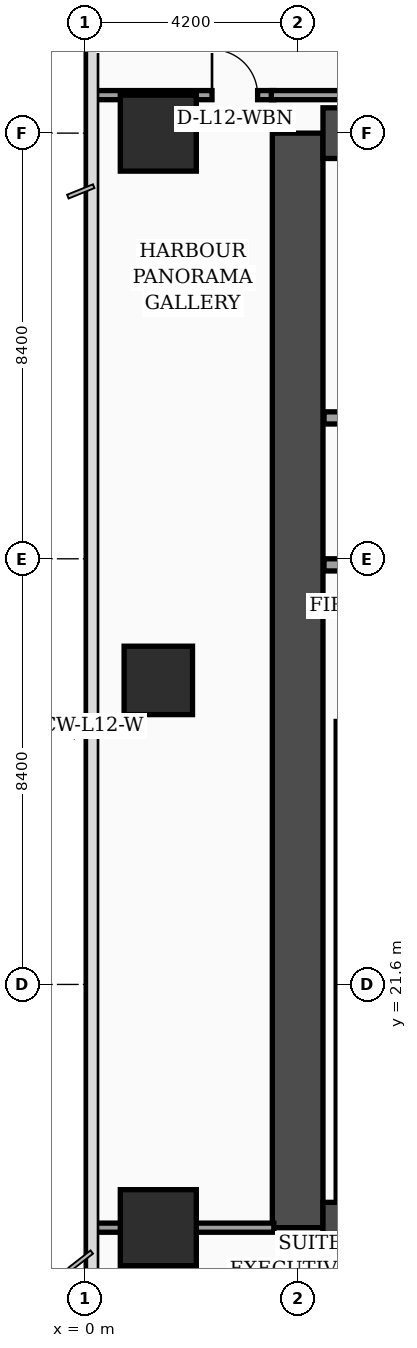
"""IFC4 building model, lengths in metres.
Left out: names, types, materials, properties, quantities, classifications, styles, units other than length and angle.
Written with IfcOpenShell. Run it as: python <this file> out.ifc"""

import sys

from ifc_helpers import new_model, si_unit, direction, frame, frame_2d, origin, origin_2d, place, context, subcontext, project, spatial, rectangle, extrude, element, fill, save


model = new_model("IFC4")
c1 = context("Model", 3, precision=1e-05, world=origin(), true_north=direction((0.0, 1.0)))
c2 = subcontext(c1, "Body", "Model", "MODEL_VIEW")
j1 = project(units=[si_unit("LENGTHUNIT", "METRE"), si_unit("PLANEANGLEUNIT", "RADIAN")], contexts=[c1])
p1 = place(None, origin())
s1 = spatial("IfcSite", under=j1, at=p1, CompositionType="ELEMENT")
p2 = place(p1, origin())
s2 = spatial("IfcBuilding", under=s1, at=p2, CompositionType="ELEMENT")
p3 = place(p2, frame((0.0, 0.0, 54.6)))
s3 = spatial("IfcBuildingStorey", under=s2, at=p3, CompositionType="ELEMENT", Elevation=54.6)
p4 = place(p3, frame((4.2, 16.8, 0.0), z_axis=(0.0, 0.0, 1.0), x_axis=(0.0, 1.0, 0.0)))
e1 = element("IfcWall", 1, at=p4, inside=s3, PredefinedType="SHEAR", context=c2, shape_type="SweptSolid", body=[
    extrude(rectangle(XDim=21.6, YDim=1.0, at=frame_2d((10.8, 0.0))), origin(), (0.0, 0.0, 1.0), 3.56),
])
for number, where, z_axis, x_axis in (
    (2, (4.7, 38.4, 0.0), (0.0, 0.0, 1.0), (1.0, 0.0, 0.0)),
    (3, (4.7, 16.8, 0.0), (0.0, 0.0, 1.0), (1.0, 0.0, 0.0)),
):
    element("IfcWall", number, at=place(p3, frame(where, z_axis=z_axis, x_axis=x_axis)), inside=s3, PredefinedType="SHEAR", context=c2, shape_type="SweptSolid", body=[
        extrude(rectangle(XDim=9.8, YDim=1.0, at=frame_2d((4.9, 0.0))), origin(), (0.0, 0.0, 1.0), 3.56),
    ])
p5 = place(p3, frame((5.08, 17.3, 0.0), z_axis=(0.0, 0.0, 1.0), x_axis=(0.0, 1.0, 0.0)))
e4 = element("IfcWall", 4, at=p5, inside=s3, PredefinedType="SOLIDWALL", context=c2, shape_type="SweptSolid", body=[
    extrude(rectangle(XDim=9.49, YDim=0.24, at=frame_2d((4.745, 0.0))), origin(), (0.0, 0.0, 1.0), 3.56),
])
p6 = place(p3, frame((1.45, 16.8, 0.0), z_axis=(0.0, 0.0, 1.0), x_axis=(1.0, 0.0, 0.0)))
e5 = element("IfcColumn", 5, at=p6, inside=s3, PredefinedType="COLUMN", context=c2, shape_type="SweptSolid", body=[
    extrude(rectangle(XDim=1.5, YDim=1.5, at=origin_2d()), origin(), (0.0, 0.0, 1.0), 3.56),
])
p7 = place(p3, frame((1.45, 27.6, 0.0), z_axis=(0.0, 0.0, 1.0), x_axis=(1.0, 0.0, 0.0)))
e6 = element("IfcColumn", 6, at=p7, inside=s3, PredefinedType="COLUMN", context=c2, shape_type="SweptSolid", body=[
    extrude(rectangle(XDim=1.35, YDim=1.35, at=origin_2d()), origin(), (0.0, 0.0, 1.0), 3.56),
])
p8 = place(p3, frame((1.45, 38.4, 0.0), z_axis=(0.0, 0.0, 1.0), x_axis=(1.0, 0.0, 0.0)))
e7 = element("IfcColumn", 7, at=p8, inside=s3, PredefinedType="COLUMN", context=c2, shape_type="SweptSolid", body=[
    extrude(rectangle(XDim=1.5, YDim=1.5, at=origin_2d()), origin(), (0.0, 0.0, 1.0), 3.56),
])
p9 = place(p3, frame((4.72, 29.88, 0.0), z_axis=(0.0, 0.0, 1.0), x_axis=(1.0, 0.0, 0.0)))
e8 = element("IfcWall", 8, at=p9, inside=s3, PredefinedType="SOLIDWALL", context=c2, shape_type="SweptSolid", body=[
    extrude(rectangle(XDim=4.7, YDim=0.24, at=frame_2d((2.35, 0.0))), origin(), (0.0, 0.0, 1.0), 3.56),
])
p10 = place(p9, frame((0.45, 0.0, 0.0)))
e9 = element("IfcOpeningElement", 9, at=p10, cuts=e8, PredefinedType="OPENING", context=c2, shape_type="SweptSolid", body=[
    extrude(rectangle(XDim=1.3, YDim=2.35, at=frame_2d((0.65, 1.175))), frame((0.0, 0.13, 0.0), z_axis=(0.0, -1.0, 0.0), x_axis=(1.0, 0.0, 0.0)), (0.0, 0.0, 1.0), 0.26),
])
p11 = place(p3, frame((4.72, 32.78, 0.0), z_axis=(0.0, 0.0, 1.0), x_axis=(1.0, 0.0, 0.0)))
e10 = element("IfcWall", 10, at=p11, inside=s3, PredefinedType="SOLIDWALL", context=c2, shape_type="SweptSolid", body=[
    extrude(rectangle(XDim=4.7, YDim=0.24, at=frame_2d((2.35, 0.0))), origin(), (0.0, 0.0, 1.0), 3.56),
])
p12 = place(p3, frame((0.08, 16.8, 0.0), z_axis=(0.0, 0.0, 1.0), x_axis=(1.0, 0.0, 0.0)))
e11 = element("IfcWall", 11, at=p12, inside=s3, PredefinedType="PARTITIONING", context=c2, shape_type="SweptSolid", body=[
    extrude(rectangle(XDim=3.65, YDim=0.18, at=frame_2d((1.825, 0.0))), origin(), (0.0, 0.0, 1.0), 2.84),
])
p13 = place(p3, frame((0.08, 39.15, 0.0), z_axis=(0.0, 0.0, 1.0), x_axis=(1.0, 0.0, 0.0)))
e12 = element("IfcWall", 12, at=p13, inside=s3, PredefinedType="PARTITIONING", context=c2, shape_type="SweptSolid", body=[
    extrude(rectangle(XDim=3.65, YDim=0.18, at=frame_2d((1.825, 0.0))), origin(), (0.0, 0.0, 1.0), 2.84),
])
p14 = place(p13, frame((2.43, 0.0, 0.0)))
e13 = element("IfcOpeningElement", 13, at=p14, cuts=e12, PredefinedType="OPENING", context=c2, shape_type="SweptSolid", body=[
    extrude(rectangle(XDim=0.9, YDim=2.15, at=frame_2d((0.45, 1.075))), frame((0.0, 0.1, 0.0), z_axis=(0.0, -1.0, 0.0), x_axis=(1.0, 0.0, 0.0)), (0.0, 0.0, 1.0), 0.2),
])
p15 = place(p3, frame((3.68, 39.15, 0.0), z_axis=(0.0, 0.0, 1.0), x_axis=(1.0, 0.0, 0.0)))
e14 = element("IfcWall", 14, at=p15, inside=s3, PredefinedType="PARTITIONING", context=c2, shape_type="SweptSolid", body=[
    extrude(rectangle(XDim=11.47, YDim=0.18, at=frame_2d((5.735, 0.0))), origin(), (0.0, 0.0, 1.0), 2.84),
])
p16 = place(p14, origin())
e15 = element("IfcDoor", 15, at=p16, inside=s3, OperationType="SINGLE_SWING_LEFT", PredefinedType="DOOR", context=c2, shape_type="SweptSolid", body=[
    extrude(rectangle(XDim=0.9, YDim=2.15, at=frame_2d((0.45, 1.075))), frame((0.0, 0.025, 0.0), z_axis=(0.0, -1.0, 0.0), x_axis=(1.0, 0.0, 0.0)), (0.0, 0.0, 1.0), 0.05),
])
fill(e13, e15)
save(model, sys.argv[1])
